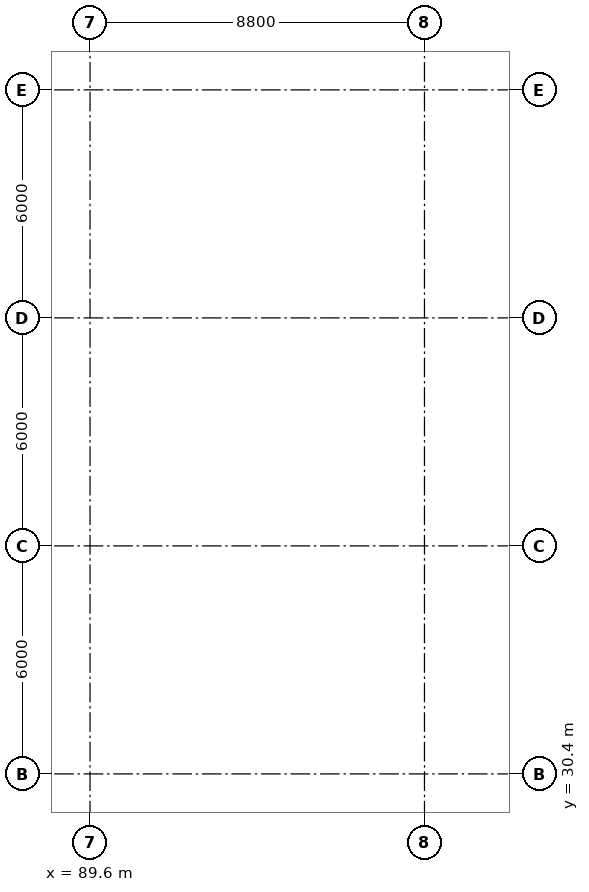
"""IFC4 building model, lengths in metres.
Left out: names, types, materials, properties, quantities, classifications, styles, units other than length and angle.
Written with IfcOpenShell. Run it as: python <this file> out.ifc"""

import sys

from ifc_helpers import new_model, si_unit, direction, frame, frame_2d, origin, origin_2d, place, context, subcontext, project, spatial, rectangle, extrude, element, fill, save


model = new_model("IFC4")
c1 = context("Model", 3, precision=1e-05, world=origin(), true_north=direction((0.0, 1.0)))
c2 = subcontext(c1, "Body", "Model", "MODEL_VIEW")
j1 = project(units=[si_unit("LENGTHUNIT", "METRE"), si_unit("PLANEANGLEUNIT", "RADIAN")], contexts=[c1])
p1 = place(None, origin())
s1 = spatial("IfcSite", under=j1, at=p1, CompositionType="ELEMENT")
p2 = place(p1, origin())
s2 = spatial("IfcBuilding", under=s1, at=p2, CompositionType="ELEMENT")
p3 = place(p2, frame((0.0, 0.0, 19.0)))
s3 = spatial("IfcBuildingStorey", under=s2, at=p3, CompositionType="ELEMENT", Elevation=19.0)
p4 = place(p3, frame((99.4, 30.4, 0.0), z_axis=(0.0, 0.0, 1.0), x_axis=(1.0, 0.0, 0.0)))
e1 = element("IfcColumn", 1, at=p4, inside=s3, PredefinedType="COLUMN", context=c2, shape_type="SweptSolid", body=[
    extrude(rectangle(XDim=1.2, YDim=1.2, at=origin_2d()), origin(), (0.0, 0.0, 1.0), 4.25),
])
for number, where, z_axis, x_axis in (
    (2, (99.4, 36.4, 0.0), (0.0, 0.0, 1.0), (1.0, 0.0, 0.0)),
    (3, (99.4, 42.4, 0.0), (0.0, 0.0, 1.0), (1.0, 0.0, 0.0)),
    (4, (99.4, 48.4, 0.0), (0.0, 0.0, 1.0), (1.0, 0.0, 0.0)),
):
    element("IfcColumn", number, at=place(p3, frame(where, z_axis=z_axis, x_axis=x_axis)), inside=s3, PredefinedType="COLUMN", context=c2, shape_type="SweptSolid", body=[
        extrude(rectangle(XDim=1.2, YDim=1.2, at=origin_2d()), origin(), (0.0, 0.0, 1.0), 4.5),
    ])
p5 = place(p3, frame((84.05, 30.4, 0.0), z_axis=(0.0, 0.0, 1.0), x_axis=(1.0, 0.0, 0.0)))
e5 = element("IfcWall", 5, at=p5, inside=s3, PredefinedType="PARTITIONING", context=c2, shape_type="SweptSolid", body=[
    extrude(rectangle(XDim=5.1, YDim=0.15, at=frame_2d((2.55, 0.0))), origin(), (0.0, 0.0, 1.0), 4.25),
])
p6 = place(p5, frame((0.15, 0.0, 0.0)))
e6 = element("IfcOpeningElement", 6, at=p6, cuts=e5, PredefinedType="OPENING", context=c2, shape_type="SweptSolid", body=[
    extrude(rectangle(XDim=1.8, YDim=2.1, at=frame_2d((0.9, 1.05))), frame((0.0, 0.085, 0.0), z_axis=(0.0, -1.0, 0.0), x_axis=(1.0, 0.0, 0.0)), (0.0, 0.0, 1.0), 0.17),
])
p7 = place(p3, frame((89.15, 30.4, 0.0), z_axis=(0.0, 0.0, 1.0), x_axis=(1.0, 0.0, 0.0)))
e7 = element("IfcWall", 7, at=p7, inside=s3, PredefinedType="PARTITIONING", context=c2, shape_type="SweptSolid", body=[
    extrude(rectangle(XDim=0.9, YDim=0.15, at=frame_2d((0.45, 0.0))), origin(), (0.0, 0.0, 1.0), 2.947),
])
p8 = place(p3, frame((90.05, 30.4, 0.0), z_axis=(0.0, 0.0, 1.0), x_axis=(1.0, 0.0, 0.0)))
e8 = element("IfcWall", 8, at=p8, inside=s3, PredefinedType="PARTITIONING", context=c2, shape_type="SweptSolid", body=[
    extrude(rectangle(XDim=8.75, YDim=0.15, at=frame_2d((4.375, 0.0))), origin(), (0.0, 0.0, 1.0), 3.415),
])
p9 = place(p3, frame((89.675, 48.4, 0.0), z_axis=(0.0, 0.0, 1.0), x_axis=(1.0, 0.0, 0.0)))
e9 = element("IfcWall", 9, at=p9, inside=s3, PredefinedType="PARTITIONING", context=c2, shape_type="SweptSolid", body=[
    extrude(rectangle(XDim=9.125, YDim=0.1, at=frame_2d((4.562, 0.0))), origin(), (0.0, 0.0, 1.0), 2.95),
])
p10 = place(p3, frame((89.6, 30.475, 0.0), z_axis=(0.0, 0.0, 1.0), x_axis=(0.0, 1.0, 0.0)))
e10 = element("IfcWall", 10, at=p10, inside=s3, PredefinedType="PARTITIONING", context=c2, shape_type="SweptSolid", body=[
    extrude(rectangle(XDim=5.475, YDim=0.15, at=frame_2d((2.737, 0.0))), origin(), (0.0, 0.0, 1.0), 2.947),
])
p11 = place(p3, frame((89.6, 35.955, 0.0), z_axis=(0.0, 0.0, 1.0), x_axis=(0.0, 1.0, 0.0)))
e11 = element("IfcWall", 11, at=p11, inside=s3, PredefinedType="PARTITIONING", context=c2, shape_type="SweptSolid", body=[
    extrude(rectangle(XDim=0.895, YDim=0.15, at=frame_2d((0.448, 0.0))), origin(), (0.0, 0.0, 1.0), 2.944),
])
p12 = place(p3, frame((89.6, 36.85, 0.0), z_axis=(0.0, 0.0, 1.0), x_axis=(0.0, 1.0, 0.0)))
e12 = element("IfcWall", 12, at=p12, inside=s3, PredefinedType="PARTITIONING", context=c2, shape_type="SweptSolid", body=[
    extrude(rectangle(XDim=5.1, YDim=0.15, at=frame_2d((2.55, 0.0))), origin(), (0.0, 0.0, 1.0), 4.25),
])
p13 = place(p12, frame((1.65, 0.0, 0.0)))
e13 = element("IfcOpeningElement", 13, at=p13, cuts=e12, PredefinedType="OPENING", context=c2, shape_type="SweptSolid", body=[
    extrude(rectangle(XDim=1.8, YDim=2.1, at=frame_2d((0.9, 1.05))), frame((0.0, 0.085, 0.0), z_axis=(0.0, -1.0, 0.0), x_axis=(1.0, 0.0, 0.0)), (0.0, 0.0, 1.0), 0.17),
])
p14 = place(p3, frame((89.6, 41.95, 0.0), z_axis=(0.0, 0.0, 1.0), x_axis=(0.0, 1.0, 0.0)))
e14 = element("IfcWall", 14, at=p14, inside=s3, PredefinedType="PARTITIONING", context=c2, shape_type="SweptSolid", body=[
    extrude(rectangle(XDim=0.9, YDim=0.15, at=frame_2d((0.45, 0.0))), origin(), (0.0, 0.0, 1.0), 2.95),
])
p15 = place(p3, frame((89.6, 42.85, 0.0), z_axis=(0.0, 0.0, 1.0), x_axis=(0.0, 1.0, 0.0)))
e15 = element("IfcWall", 15, at=p15, inside=s3, PredefinedType="PARTITIONING", context=c2, shape_type="SweptSolid", body=[
    extrude(rectangle(XDim=5.1, YDim=0.15, at=frame_2d((2.55, 0.0))), origin(), (0.0, 0.0, 1.0), 4.25),
])
p16 = place(p3, frame((89.6, 47.95, 0.0), z_axis=(0.0, 0.0, 1.0), x_axis=(0.0, 1.0, 0.0)))
e16 = element("IfcWall", 16, at=p16, inside=s3, PredefinedType="PARTITIONING", context=c2, shape_type="SweptSolid", body=[
    extrude(rectangle(XDim=0.9, YDim=0.15, at=frame_2d((0.45, 0.0))), origin(), (0.0, 0.0, 1.0), 2.95),
])
p17 = place(p3, frame((89.6, 48.85, 0.0), z_axis=(0.0, 0.0, 1.0), x_axis=(0.0, 1.0, 0.0)))
e17 = element("IfcWall", 17, at=p17, inside=s3, PredefinedType="PARTITIONING", context=c2, shape_type="SweptSolid", body=[
    extrude(rectangle(XDim=5.1, YDim=0.15, at=frame_2d((2.55, 0.0))), origin(), (0.0, 0.0, 1.0), 4.25),
])
p18 = place(p17, frame((2.05, 0.0, 0.0)))
e18 = element("IfcOpeningElement", 18, at=p18, cuts=e17, PredefinedType="OPENING", context=c2, shape_type="SweptSolid", body=[
    extrude(rectangle(XDim=1.0, YDim=2.1, at=frame_2d((0.5, 1.05))), frame((0.0, 0.085, 0.0), z_axis=(0.0, -1.0, 0.0), x_axis=(1.0, 0.0, 0.0)), (0.0, 0.0, 1.0), 0.17),
])
p19 = place(p13, origin())
e19 = element("IfcDoor", 19, at=p19, inside=s3, OperationType="DOUBLE_DOOR_SINGLE_SWING", PredefinedType="DOOR", context=c2, shape_type="SweptSolid", body=[
    extrude(rectangle(XDim=1.8, YDim=2.1, at=frame_2d((0.9, 1.05))), frame((0.0, 0.025, 0.0), z_axis=(0.0, -1.0, 0.0), x_axis=(1.0, 0.0, 0.0)), (0.0, 0.0, 1.0), 0.05),
])
fill(e13, e19)
save(model, sys.argv[1])
